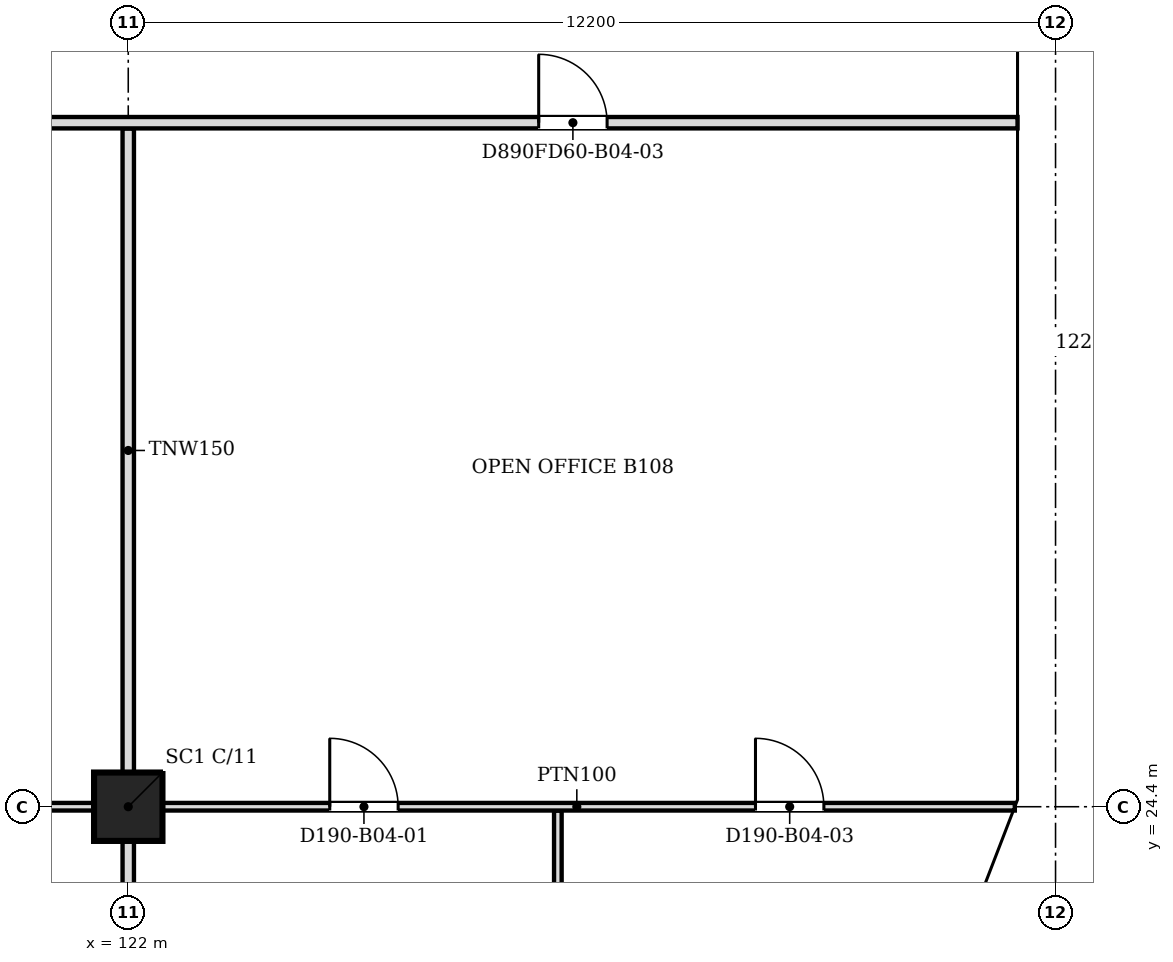
"""IFC4 building model, lengths in metres.
Left out: names, types, materials, properties, quantities, classifications, styles, units other than length and angle.
Written with IfcOpenShell. Run it as: python <this file> out.ifc"""

import sys

from ifc_helpers import new_model, si_unit, direction, frame, frame_2d, origin, origin_2d, place, context, subcontext, project, spatial, polyline, rectangle, outline, extrude, faceted_brep, source, transform, mapped, element, fill, save


model = new_model("IFC4")
c1 = context("Model", 3, precision=1e-05, world=origin(), true_north=direction((0.0, 1.0)))
c2 = subcontext(c1, "Body", "Model", "MODEL_VIEW")
j1 = project(units=[si_unit("LENGTHUNIT", "METRE"), si_unit("PLANEANGLEUNIT", "RADIAN")], contexts=[c1])
p1 = place(None, origin())
s1 = spatial("IfcSite", under=j1, at=p1, CompositionType="ELEMENT")
p2 = place(p1, origin())
s2 = spatial("IfcBuilding", under=s1, at=p2, CompositionType="ELEMENT")
p3 = place(p2, frame((0.0, 0.0, 37.2)))
s3 = spatial("IfcBuildingStorey", under=s2, at=p3, CompositionType="ELEMENT", Elevation=37.2)
p4 = place(p3, frame((122.0, 24.4, 0.0), z_axis=(0.0, 0.0, 1.0), x_axis=(1.0, 0.0, 0.0)))
e1 = element("IfcColumn", 1, at=p4, inside=s3, PredefinedType="COLUMN", context=c2, shape_type="SweptSolid", body=[
    extrude(rectangle(XDim=0.9, YDim=0.9, at=origin_2d()), origin(), (0.0, 0.0, 1.0), 3.6),
])
m1 = source(origin(), c2, "Body", "Brep", [
    faceted_brep([(2.95, -0.25, 0.0), (2.997, -0.25, 0.059), (2.997, -0.25, 7.541), (2.95, -0.25, 7.6), (0.0, -0.25, 3.8), (0.053, 0.25, 3.868), (2.904, 0.25, 7.54), (2.904, 0.25, 0.06), (0.053, 0.25, 3.732), (2.95, 0.0, 0.0), (2.95, 0.0, 7.6), (0.0, 0.0, 3.8)], [[[0, 1, 2, 3, 4]], [[5, 6, 7, 8]], [[1, 0, 9]], [[10, 3, 2]], [[6, 5, 11, 4, 3, 10]], [[8, 7, 9, 0, 4, 11]], [[8, 11, 5]], [[1, 9, 7, 6, 10, 2]]]),
])
p5 = place(p3, frame((132.888, 21.694, -3.8), z_axis=(0.0, 0.0, 1.0), x_axis=(0.359901446078, 0.932990326376, 0.0)))
e2 = element("IfcWall", 2, at=p5, inside=s3, PredefinedType="SOLIDWALL", context=c2, shape_type="MappedRepresentation", body=[
    mapped(m1, transform((0.0, 0.0, 0.0), scale=1.0)),
])
m2 = source(origin(), c2, "Body", "SweptSolid", [
    extrude(outline(polyline([(2.75, 6.935), (0.316, 3.8), (2.75, 0.665), (2.75, 6.935)])), frame((0.0, 0.26, 0.0), z_axis=(0.0, -1.0, 0.0), x_axis=(1.0, 0.0, 0.0)), (0.0, 0.0, 1.0), 0.52),
])
p6 = place(p5, origin())
e3 = element("IfcOpeningElement", 3, at=p6, cuts=e2, PredefinedType="OPENING", context=c2, shape_type="MappedRepresentation", body=[
    mapped(m2, transform((0.0, 0.0, 0.0), scale=1.0)),
])
m3 = source(origin(), c2, "Body", "Brep", [
    faceted_brep([(0.047, -0.25, 0.0), (3.05, -0.25, 3.8), (0.047, -0.25, 7.6), (0.0, -0.25, 7.54), (0.0, -0.25, 0.06), (0.093, 0.25, 7.541), (3.05, 0.25, 3.8), (0.093, 0.25, 0.059), (0.047, 0.0, 0.0), (0.047, 0.0, 7.6)], [[[0, 1, 2, 3, 4]], [[5, 6, 7]], [[7, 6, 1, 0, 8]], [[6, 5, 9, 2, 1]], [[3, 2, 9]], [[8, 0, 4]], [[7, 8, 4, 3, 9, 5]]]),
])
p7 = place(p3, frame((133.95, 24.4, -3.8), z_axis=(0.0, 0.0, 1.0), x_axis=(0.0, 1.0, 0.0)))
e4 = element("IfcWall", 4, at=p7, inside=s3, PredefinedType="SOLIDWALL", context=c2, shape_type="MappedRepresentation", body=[
    mapped(m3, transform((0.0, 0.0, 0.0), scale=1.0)),
])
m4 = source(origin(), c2, "Body", "SweptSolid", [
    extrude(outline(polyline([(0.247, 0.656), (2.731, 3.8), (0.247, 6.944), (0.247, 0.656)])), frame((0.0, 0.26, 0.0), z_axis=(0.0, -1.0, 0.0), x_axis=(1.0, 0.0, 0.0)), (0.0, 0.0, 1.0), 0.52),
])
p8 = place(p7, origin())
e5 = element("IfcOpeningElement", 5, at=p8, cuts=e4, PredefinedType="OPENING", context=c2, shape_type="MappedRepresentation", body=[
    mapped(m4, transform((0.0, 0.0, 0.0), scale=1.0)),
])
m5 = source(origin(), c2, "Body", "SweptSolid", [
    extrude(outline(polyline([(3.05, 0.0), (6.1, 3.8), (3.05, 7.6), (0.0, 3.8), (3.05, 0.0)])), frame((0.0, 0.25, 0.0), z_axis=(0.0, -1.0, 0.0), x_axis=(1.0, 0.0, 0.0)), (0.0, 0.0, 1.0), 0.5),
])
p9 = place(p3, frame((133.95, 27.45, -3.8), z_axis=(0.0, 0.0, 1.0), x_axis=(0.0, 1.0, 0.0)))
e6 = element("IfcWall", 6, at=p9, inside=s3, PredefinedType="SOLIDWALL", context=c2, shape_type="MappedRepresentation", body=[
    mapped(m5, transform((0.0, 0.0, 0.0), scale=1.0)),
])
m6 = source(origin(), c2, "Body", "SweptSolid", [
    extrude(outline(polyline([(3.05, 0.399), (5.78, 3.8), (3.05, 7.201), (0.321, 3.8), (3.05, 0.399)])), frame((0.0, 0.26, 0.0), z_axis=(0.0, -1.0, 0.0), x_axis=(1.0, 0.0, 0.0)), (0.0, 0.0, 1.0), 0.52),
])
p10 = place(p9, origin())
e7 = element("IfcOpeningElement", 7, at=p10, cuts=e6, PredefinedType="OPENING", context=c2, shape_type="MappedRepresentation", body=[
    mapped(m6, transform((0.0, 0.0, 0.0), scale=1.0)),
])
m7 = source(origin(), c2, "Body", "Brep", [
    faceted_brep([(3.05, -0.25, 0.0), (6.1, -0.25, 3.8), (6.1, -0.25, 3.8), (3.05, -0.25, 7.6), (0.0, -0.25, 3.8), (0.0, 0.25, 3.8), (3.05, 0.25, 7.6), (6.1, 0.25, 3.8), (6.1, 0.25, 3.8), (3.05, 0.25, 0.0)], [[[0, 1, 2, 3, 4]], [[5, 6, 7, 8, 9]], [[9, 8, 1, 0]], [[7, 6, 3, 2]], [[6, 5, 4, 3]], [[5, 9, 0, 4]], [[1, 8, 7, 2]]]),
])
p11 = place(p3, frame((133.95, 33.55, -3.8), z_axis=(0.0, 0.0, 1.0), x_axis=(0.0, 1.0, 0.0)))
e8 = element("IfcWall", 8, at=p11, inside=s3, PredefinedType="SOLIDWALL", context=c2, shape_type="MappedRepresentation", body=[
    mapped(m7, transform((0.0, 0.0, 0.0), scale=1.0)),
])
p12 = place(p11, origin())
e9 = element("IfcOpeningElement", 9, at=p12, cuts=e8, PredefinedType="OPENING", context=c2, shape_type="MappedRepresentation", body=[
    mapped(m6, transform((0.0, 0.0, 0.0), scale=1.0)),
])
p13 = place(p2, frame((0.0, 0.0, 41.0)))
s4 = spatial("IfcBuildingStorey", under=s2, at=p13, CompositionType="ELEMENT", Elevation=41.0)
m8 = source(origin(), c2, "Body", "Brep", [
    faceted_brep([(0.053, -0.25, 0.0), (3.003, -0.25, 3.8), (0.053, -0.25, 7.6), (0.0, -0.25, 7.532), (0.0, -0.25, 0.068), (0.106, 0.25, 7.532), (2.957, 0.25, 3.86), (2.957, 0.25, 3.74), (0.106, 0.25, 0.068), (3.003, 0.0, 3.8), (0.053, 0.0, 0.0), (0.053, 0.0, 7.6)], [[[0, 1, 2, 3, 4]], [[5, 6, 7, 8]], [[8, 7, 9, 1, 0, 10]], [[6, 5, 11, 2, 1, 9]], [[3, 2, 11]], [[10, 0, 4]], [[8, 10, 4, 3, 11, 5]], [[9, 7, 6]]]),
])
p14 = place(p13, frame((132.869, 21.644, -3.8), z_axis=(0.0, 0.0, 1.0), x_axis=(0.359855894603, 0.933007896601, 0.0)))
e10 = element("IfcWall", 10, at=p14, inside=s4, PredefinedType="SOLIDWALL", context=c2, shape_type="MappedRepresentation", body=[
    mapped(m8, transform((0.0, 0.0, 0.0), scale=1.0)),
])
m9 = source(origin(), c2, "Body", "SweptSolid", [
    extrude(outline(polyline([(0.253, 0.665), (2.687, 3.8), (0.253, 6.935), (0.253, 0.665)])), frame((0.0, 0.26, 0.0), z_axis=(0.0, -1.0, 0.0), x_axis=(1.0, 0.0, 0.0)), (0.0, 0.0, 1.0), 0.52),
])
p15 = place(p14, origin())
e11 = element("IfcOpeningElement", 11, at=p15, cuts=e10, PredefinedType="OPENING", context=c2, shape_type="MappedRepresentation", body=[
    mapped(m9, transform((0.0, 0.0, 0.0), scale=1.0)),
])
m10 = source(origin(), c2, "Body", "Brep", [
    faceted_brep([(3.003, -0.25, 0.0), (6.053, -0.25, 3.8), (3.003, -0.25, 7.6), (0.0, -0.25, 3.8), (0.047, 0.25, 3.859), (3.003, 0.25, 7.6), (6.053, 0.25, 3.8), (3.003, 0.25, 0.0), (0.047, 0.25, 3.741), (0.0, 0.0, 3.8)], [[[0, 1, 2, 3]], [[4, 5, 6, 7, 8]], [[7, 6, 1, 0]], [[6, 5, 2, 1]], [[5, 4, 9, 3, 2]], [[8, 7, 0, 3, 9]], [[8, 9, 4]]]),
])
p16 = place(p13, frame((133.95, 24.447, -3.8), z_axis=(0.0, 0.0, 1.0), x_axis=(0.0, 1.0, 0.0)))
e12 = element("IfcWall", 12, at=p16, inside=s4, PredefinedType="SOLIDWALL", context=c2, shape_type="MappedRepresentation", body=[
    mapped(m10, transform((0.0, 0.0, 0.0), scale=1.0)),
])
m11 = source(origin(), c2, "Body", "SweptSolid", [
    extrude(outline(polyline([(3.005, 0.401), (5.733, 3.8), (3.005, 7.199), (0.319, 3.8), (3.005, 0.401)])), frame((0.0, 0.26, 0.0), z_axis=(0.0, -1.0, 0.0), x_axis=(1.0, 0.0, 0.0)), (0.0, 0.0, 1.0), 0.52),
])
p17 = place(p16, origin())
e13 = element("IfcOpeningElement", 13, at=p17, cuts=e12, PredefinedType="OPENING", context=c2, shape_type="MappedRepresentation", body=[
    mapped(m11, transform((0.0, 0.0, 0.0), scale=1.0)),
])
p18 = place(p13, frame((133.95, 30.5, -3.8), z_axis=(0.0, 0.0, 1.0), x_axis=(0.0, 1.0, 0.0)))
e14 = element("IfcWall", 14, at=p18, inside=s4, PredefinedType="SOLIDWALL", context=c2, shape_type="MappedRepresentation", body=[
    mapped(m5, transform((0.0, 0.0, 0.0), scale=1.0)),
])
p19 = place(p18, origin())
e15 = element("IfcOpeningElement", 15, at=p19, cuts=e14, PredefinedType="OPENING", context=c2, shape_type="MappedRepresentation", body=[
    mapped(m6, transform((0.0, 0.0, 0.0), scale=1.0)),
])
p20 = place(p3, frame((122.0, 18.8, 0.0), z_axis=(0.0, 0.0, 1.0), x_axis=(0.0, 1.0, 0.0)))
e16 = element("IfcWall", 16, at=p20, inside=s3, PredefinedType="PARTITIONING", context=c2, shape_type="SweptSolid", body=[
    extrude(rectangle(XDim=5.149, YDim=0.15, at=frame_2d((2.574, 0.0))), origin(), (0.0, 0.0, 1.0), 3.067),
])
p21 = place(p3, frame((127.652, 18.8, 0.0), z_axis=(0.0, 0.0, 1.0), x_axis=(0.0, 1.0, 0.0)))
e17 = element("IfcWall", 17, at=p21, inside=s3, PredefinedType="PARTITIONING", context=c2, shape_type="SweptSolid", body=[
    extrude(rectangle(XDim=5.549, YDim=0.1, at=frame_2d((2.774, 0.0))), origin(), (0.0, 0.0, 1.0), 3.067),
])
p22 = place(p3, frame((121.549, 24.4, 0.0), z_axis=(0.0, 0.0, 1.0), x_axis=(-1.0, 0.0, 0.0)))
e18 = element("IfcWall", 18, at=p22, inside=s3, PredefinedType="PARTITIONING", context=c2, shape_type="SweptSolid", body=[
    extrude(rectangle(XDim=5.073, YDim=0.1, at=frame_2d((2.537, 0.0))), origin(), (0.0, 0.0, 1.0), 3.067),
])
m12 = source(origin(), c2, "Body", "SweptSolid", [
    extrude(rectangle(XDim=0.9, YDim=2.1, at=frame_2d((0.45, 1.05))), frame((0.0, 0.06, 0.0), z_axis=(0.0, -1.0, 0.0), x_axis=(1.0, 0.0, 0.0)), (0.0, 0.0, 1.0), 0.12),
])
p23 = place(p22, frame((2.073, 0.0, 0.0)))
e19 = element("IfcOpeningElement", 19, at=p23, cuts=e18, PredefinedType="OPENING", context=c2, shape_type="MappedRepresentation", body=[
    mapped(m12, transform((0.0, 0.0, 0.0), scale=1.0)),
])
p24 = place(p3, frame((133.664, 24.4, 0.0), z_axis=(0.0, 0.0, 1.0), x_axis=(-1.0, 0.0, 0.0)))
e20 = element("IfcWall", 20, at=p24, inside=s3, PredefinedType="PARTITIONING", context=c2, shape_type="SweptSolid", body=[
    extrude(rectangle(XDim=11.213, YDim=0.1, at=frame_2d((5.606, 0.0))), origin(), (0.0, 0.0, 1.0), 3.067),
])
p25 = place(p24, frame((8.113, 0.0, 0.0)))
e21 = element("IfcOpeningElement", 21, at=p25, cuts=e20, PredefinedType="OPENING", context=c2, shape_type="MappedRepresentation", body=[
    mapped(m12, transform((0.0, 0.0, 0.0), scale=1.0)),
])
p26 = place(p24, frame((2.512, 0.0, 0.0)))
e22 = element("IfcOpeningElement", 22, at=p26, cuts=e20, PredefinedType="OPENING", context=c2, shape_type="MappedRepresentation", body=[
    mapped(m12, transform((0.0, 0.0, 0.0), scale=1.0)),
])
p27 = place(p3, frame((122.0, 24.851, 0.0), z_axis=(0.0, 0.0, 1.0), x_axis=(0.0, 1.0, 0.0)))
e23 = element("IfcWall", 23, at=p27, inside=s3, PredefinedType="PARTITIONING", context=c2, shape_type="SweptSolid", body=[
    extrude(rectangle(XDim=8.473, YDim=0.15, at=frame_2d((4.236, 0.0))), origin(), (0.0, 0.0, 1.0), 3.067),
])
p28 = place(p3, frame((133.7, 33.4, 0.0), z_axis=(0.0, 0.0, 1.0), x_axis=(-1.0, 0.0, 0.0)))
e24 = element("IfcWall", 24, at=p28, inside=s3, PredefinedType="PARTITIONING", context=c2, shape_type="SweptSolid", body=[
    extrude(rectangle(XDim=47.8, YDim=0.15, at=frame_2d((23.9, 0.0))), origin(), (0.0, 0.0, 1.0), 3.067),
])
m13 = source(origin(), c2, "Body", "SweptSolid", [
    extrude(rectangle(XDim=0.9, YDim=2.1, at=frame_2d((0.45, 1.05))), frame((0.0, 0.085, 0.0), z_axis=(0.0, -1.0, 0.0), x_axis=(1.0, 0.0, 0.0)), (0.0, 0.0, 1.0), 0.17),
])
p29 = place(p28, frame((14.099, 0.0, 0.0)))
e25 = element("IfcOpeningElement", 25, at=p29, cuts=e24, PredefinedType="OPENING", context=c2, shape_type="MappedRepresentation", body=[
    mapped(m13, transform((0.0, 0.0, 0.0), scale=1.0)),
])
p30 = place(p28, frame((44.3, 0.0, 0.0)))
e26 = element("IfcOpeningElement", 26, at=p30, cuts=e24, PredefinedType="OPENING", context=c2, shape_type="MappedRepresentation", body=[
    mapped(m13, transform((0.0, 0.0, 0.0), scale=1.0)),
])
p31 = place(p28, frame((5.4, 0.0, 0.0)))
e27 = element("IfcOpeningElement", 27, at=p31, cuts=e24, PredefinedType="OPENING", context=c2, shape_type="MappedRepresentation", body=[
    mapped(m13, transform((0.0, 0.0, 0.0), scale=1.0)),
])
m14 = source(origin(), c2, "Body", "SweptSolid", [
    extrude(rectangle(XDim=1.0, YDim=2.1, at=frame_2d((0.5, 1.05))), frame((0.0, 0.085, 0.0), z_axis=(0.0, -1.0, 0.0), x_axis=(1.0, 0.0, 0.0)), (0.0, 0.0, 1.0), 0.17),
])
p32 = place(p28, frame((22.899, 0.0, 0.0)))
e28 = element("IfcOpeningElement", 28, at=p32, cuts=e24, PredefinedType="OPENING", context=c2, shape_type="MappedRepresentation", body=[
    mapped(m14, transform((0.0, 0.0, 0.0), scale=1.0)),
])
p33 = place(p28, frame((35.1, 0.0, 0.0)))
e29 = element("IfcOpeningElement", 29, at=p33, cuts=e24, PredefinedType="OPENING", context=c2, shape_type="MappedRepresentation", body=[
    mapped(m14, transform((0.0, 0.0, 0.0), scale=1.0)),
])
m15 = source(origin(), c2, "Body", "SweptSolid", [
    extrude(rectangle(XDim=0.9, YDim=2.1, at=frame_2d((0.45, 1.05))), frame((0.0, 0.025, 0.0), z_axis=(0.0, -1.0, 0.0), x_axis=(1.0, 0.0, 0.0)), (0.0, 0.0, 1.0), 0.05),
])
p34 = place(p25, origin())
e30 = element("IfcDoor", 30, at=p34, inside=s3, OperationType="SINGLE_SWING_RIGHT", PredefinedType="DOOR", context=c2, shape_type="MappedRepresentation", body=[
    mapped(m15, transform((0.0, 0.0, 0.0), scale=1.0)),
])
fill(e21, e30)
p35 = place(p26, origin())
e31 = element("IfcDoor", 31, at=p35, inside=s3, OperationType="SINGLE_SWING_RIGHT", PredefinedType="DOOR", context=c2, shape_type="MappedRepresentation", body=[
    mapped(m15, transform((0.0, 0.0, 0.0), scale=1.0)),
])
fill(e22, e31)
p36 = place(p31, origin())
e32 = element("IfcDoor", 32, at=p36, inside=s3, OperationType="SINGLE_SWING_RIGHT", PredefinedType="DOOR", context=c2, shape_type="MappedRepresentation", body=[
    mapped(m15, transform((0.0, 0.0, 0.0), scale=1.0)),
])
fill(e27, e32)
save(model, sys.argv[1])
